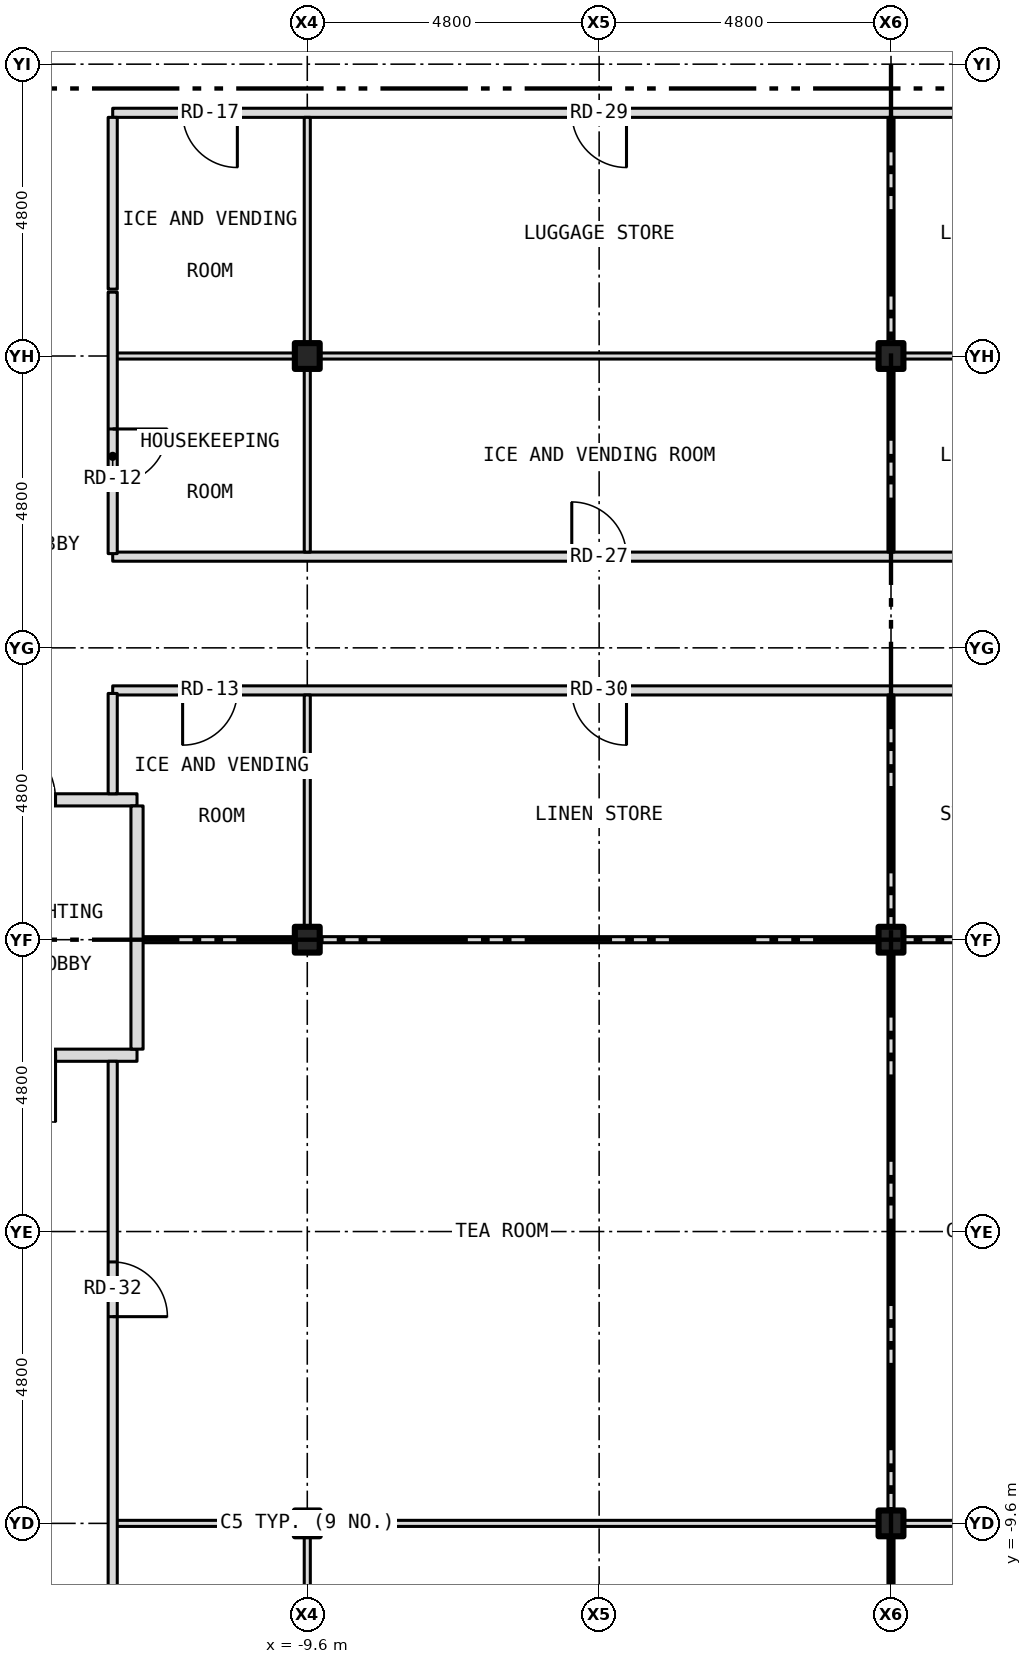
"""IFC4 building model, lengths in metres.
Left out: names, types, materials, properties, quantities, classifications, styles, units other than length and angle.
Written with IfcOpenShell. Run it as: python <this file> out.ifc"""

import sys

from ifc_helpers import new_model, si_unit, direction, frame, frame_2d, origin, origin_2d, place, context, subcontext, project, spatial, rectangle, i_section, extrude, element, fill, save


model = new_model("IFC4")
c1 = context("Model", 3, precision=1e-05, world=origin(), true_north=direction((0.0, 1.0)))
c2 = subcontext(c1, "Body", "Model", "MODEL_VIEW")
j1 = project(units=[si_unit("LENGTHUNIT", "METRE"), si_unit("PLANEANGLEUNIT", "RADIAN")], contexts=[c1])
p1 = place(None, origin())
s1 = spatial("IfcSite", under=j1, at=p1, CompositionType="ELEMENT")
p2 = place(p1, origin())
s2 = spatial("IfcBuilding", under=s1, at=p2, CompositionType="ELEMENT")
p3 = place(p2, frame((0.0, 0.0, 49.5)))
s3 = spatial("IfcBuildingStorey", under=s2, at=p3, CompositionType="ELEMENT", Elevation=49.5)
for number, where, z_axis, x_axis in (
    (1, (-9.6, -9.6, -0.15), (0.0, 0.0, 1.0), (1.0, 0.0, 0.0)),
    (2, (-9.6, 0.0, -0.15), (0.0, 0.0, 1.0), (1.0, 0.0, 0.0)),
    (3, (-9.6, 9.6, -0.15), (0.0, 0.0, 1.0), (1.0, 0.0, 0.0)),
    (4, (0.0, -9.6, -0.15), (0.0, 0.0, 1.0), (1.0, 0.0, 0.0)),
    (5, (0.0, 0.0, -0.15), (0.0, 0.0, 1.0), (1.0, 0.0, 0.0)),
    (6, (0.0, 9.6, -0.15), (0.0, 0.0, 1.0), (1.0, 0.0, 0.0)),
):
    element("IfcColumn", number, at=place(p3, frame(where, z_axis=z_axis, x_axis=x_axis)), inside=s3, PredefinedType="COLUMN", context=c2, shape_type="SweptSolid", body=[
        extrude(i_section(OverallWidth=0.409, OverallDepth=0.424, WebThickness=0.033, FlangeThickness=0.052, at=origin_2d()), origin(), (0.0, 0.0, 1.0), 3.5),
    ])
p4 = place(p3, frame((-12.8, -9.6, 0.0), z_axis=(0.0, 0.0, 1.0), x_axis=(1.0, 0.0, 0.0)))
e7 = element("IfcWall", 7, at=p4, inside=s3, PredefinedType="PARTITIONING", context=c2, shape_type="SweptSolid", body=[
    extrude(rectangle(XDim=2.996, YDim=0.1, at=frame_2d((1.498, 0.0))), origin(), (0.0, 0.0, 1.0), 2.728),
])
p5 = place(p3, frame((-9.804, -9.6, 0.0), z_axis=(0.0, 0.0, 1.0), x_axis=(1.0, 0.0, 0.0)))
e8 = element("IfcWall", 8, at=p5, inside=s3, PredefinedType="PARTITIONING", context=c2, shape_type="SweptSolid", body=[
    extrude(rectangle(XDim=0.408, YDim=0.1, at=frame_2d((0.204, 0.0))), origin(), (0.0, 0.0, 1.0), 3.35),
])
p6 = place(p3, frame((-9.396, -9.6, 0.0), z_axis=(0.0, 0.0, 1.0), x_axis=(1.0, 0.0, 0.0)))
e9 = element("IfcWall", 9, at=p6, inside=s3, PredefinedType="PARTITIONING", context=c2, shape_type="SweptSolid", body=[
    extrude(rectangle(XDim=9.192, YDim=0.1, at=frame_2d((4.596, 0.0))), origin(), (0.0, 0.0, 1.0), 2.728),
])
p7 = place(p3, frame((-0.204, -9.6, 0.0), z_axis=(0.0, 0.0, 1.0), x_axis=(1.0, 0.0, 0.0)))
e10 = element("IfcWall", 10, at=p7, inside=s3, PredefinedType="PARTITIONING", context=c2, shape_type="SweptSolid", body=[
    extrude(rectangle(XDim=0.408, YDim=0.1, at=frame_2d((0.204, 0.0))), origin(), (0.0, 0.0, 1.0), 3.35),
])
p8 = place(p3, frame((0.204, -9.6, 0.0), z_axis=(0.0, 0.0, 1.0), x_axis=(1.0, 0.0, 0.0)))
e11 = element("IfcWall", 11, at=p8, inside=s3, PredefinedType="PARTITIONING", context=c2, shape_type="SweptSolid", body=[
    extrude(rectangle(XDim=3.896, YDim=0.1, at=frame_2d((1.948, 0.0))), origin(), (0.0, 0.0, 1.0), 2.728),
])
p9 = place(p3, frame((-15.68, -1.9, 0.0), z_axis=(0.0, 0.0, 1.0), x_axis=(1.0, 0.0, 0.0)))
e12 = element("IfcWall", 12, at=p9, inside=s3, PredefinedType="PARTITIONING", context=c2, shape_type="SweptSolid", body=[
    extrude(rectangle(XDim=3.28, YDim=0.2, at=frame_2d((1.64, 0.0))), origin(), (0.0, 0.0, 1.0), 3.35),
])
p10 = place(p9, frame((0.84, 0.0, 0.0)))
e13 = element("IfcOpeningElement", 13, at=p10, cuts=e12, PredefinedType="OPENING", context=c2, shape_type="SweptSolid", body=[
    extrude(rectangle(XDim=1.1, YDim=2.1, at=frame_2d((0.55, 1.05))), frame((0.0, 0.112, 0.0), z_axis=(0.0, -1.0, 0.0), x_axis=(1.0, 0.0, 0.0)), (0.0, 0.0, 1.0), 0.224),
])
p11 = place(p3, frame((-12.4, 0.0, 0.0), z_axis=(0.0, 0.0, 1.0), x_axis=(1.0, 0.0, 0.0)))
e14 = element("IfcWall", 14, at=p11, inside=s3, PredefinedType="PARTITIONING", context=c2, shape_type="SweptSolid", body=[
    extrude(rectangle(XDim=2.596, YDim=0.1, at=frame_2d((1.298, 0.0))), origin(), (0.0, 0.0, 1.0), 2.728),
])
p12 = place(p3, frame((-9.804, 0.0, 0.0), z_axis=(0.0, 0.0, 1.0), x_axis=(1.0, 0.0, 0.0)))
e15 = element("IfcWall", 15, at=p12, inside=s3, PredefinedType="PARTITIONING", context=c2, shape_type="SweptSolid", body=[
    extrude(rectangle(XDim=0.408, YDim=0.1, at=frame_2d((0.204, 0.0))), origin(), (0.0, 0.0, 1.0), 3.35),
])
p13 = place(p3, frame((-9.396, 0.0, 0.0), z_axis=(0.0, 0.0, 1.0), x_axis=(1.0, 0.0, 0.0)))
e16 = element("IfcWall", 16, at=p13, inside=s3, PredefinedType="PARTITIONING", context=c2, shape_type="SweptSolid", body=[
    extrude(rectangle(XDim=9.192, YDim=0.1, at=frame_2d((4.596, 0.0))), origin(), (0.0, 0.0, 1.0), 2.728),
])
p14 = place(p3, frame((-0.204, 0.0, 0.0), z_axis=(0.0, 0.0, 1.0), x_axis=(1.0, 0.0, 0.0)))
e17 = element("IfcWall", 17, at=p14, inside=s3, PredefinedType="PARTITIONING", context=c2, shape_type="SweptSolid", body=[
    extrude(rectangle(XDim=0.408, YDim=0.1, at=frame_2d((0.204, 0.0))), origin(), (0.0, 0.0, 1.0), 3.35),
])
p15 = place(p3, frame((0.204, 0.0, 0.0), z_axis=(0.0, 0.0, 1.0), x_axis=(1.0, 0.0, 0.0)))
e18 = element("IfcWall", 18, at=p15, inside=s3, PredefinedType="PARTITIONING", context=c2, shape_type="SweptSolid", body=[
    extrude(rectangle(XDim=3.896, YDim=0.1, at=frame_2d((1.948, 0.0))), origin(), (0.0, 0.0, 1.0), 2.728),
])
p16 = place(p3, frame((-15.68, 2.3, 0.0), z_axis=(0.0, 0.0, 1.0), x_axis=(1.0, 0.0, 0.0)))
e19 = element("IfcWall", 19, at=p16, inside=s3, PredefinedType="PARTITIONING", context=c2, shape_type="SweptSolid", body=[
    extrude(rectangle(XDim=3.28, YDim=0.2, at=frame_2d((1.64, 0.0))), origin(), (0.0, 0.0, 1.0), 3.35),
])
p17 = place(p16, frame((0.84, 0.0, 0.0)))
e20 = element("IfcOpeningElement", 20, at=p17, cuts=e19, PredefinedType="OPENING", context=c2, shape_type="SweptSolid", body=[
    extrude(rectangle(XDim=1.1, YDim=2.1, at=frame_2d((0.55, 1.05))), frame((0.0, 0.112, 0.0), z_axis=(0.0, -1.0, 0.0), x_axis=(1.0, 0.0, 0.0)), (0.0, 0.0, 1.0), 0.224),
])
p18 = place(p3, frame((-12.8, 4.1, 0.0), z_axis=(0.0, 0.0, 1.0), x_axis=(1.0, 0.0, 0.0)))
e21 = element("IfcWall", 21, at=p18, inside=s3, PredefinedType="PARTITIONING", context=c2, shape_type="SweptSolid", body=[
    extrude(rectangle(XDim=16.9, YDim=0.15, at=frame_2d((8.45, 0.0))), origin(), (0.0, 0.0, 1.0), 3.35),
])
p19 = place(p18, frame((1.15, 0.0, 0.0)))
e22 = element("IfcOpeningElement", 22, at=p19, cuts=e21, PredefinedType="OPENING", context=c2, shape_type="SweptSolid", body=[
    extrude(rectangle(XDim=0.9, YDim=2.1, at=frame_2d((0.45, 1.05))), frame((0.0, 0.087, 0.0), z_axis=(0.0, -1.0, 0.0), x_axis=(1.0, 0.0, 0.0)), (0.0, 0.0, 1.0), 0.174),
])
p20 = place(p18, frame((14.4, 0.0, 0.0)))
e23 = element("IfcOpeningElement", 23, at=p20, cuts=e21, PredefinedType="OPENING", context=c2, shape_type="SweptSolid", body=[
    extrude(rectangle(XDim=0.9, YDim=2.1, at=frame_2d((0.45, 1.05))), frame((0.0, 0.087, 0.0), z_axis=(0.0, -1.0, 0.0), x_axis=(1.0, 0.0, 0.0)), (0.0, 0.0, 1.0), 0.174),
])
p21 = place(p18, frame((7.55, 0.0, 0.0)))
e24 = element("IfcOpeningElement", 24, at=p21, cuts=e21, PredefinedType="OPENING", context=c2, shape_type="SweptSolid", body=[
    extrude(rectangle(XDim=0.9, YDim=2.1, at=frame_2d((0.45, 1.05))), frame((0.0, 0.087, 0.0), z_axis=(0.0, -1.0, 0.0), x_axis=(1.0, 0.0, 0.0)), (0.0, 0.0, 1.0), 0.174),
])
p22 = place(p3, frame((-12.8, 6.3, 0.0), z_axis=(0.0, 0.0, 1.0), x_axis=(1.0, 0.0, 0.0)))
e25 = element("IfcWall", 25, at=p22, inside=s3, PredefinedType="PARTITIONING", context=c2, shape_type="SweptSolid", body=[
    extrude(rectangle(XDim=16.9, YDim=0.15, at=frame_2d((8.45, 0.0))), origin(), (0.0, 0.0, 1.0), 3.35),
])
p23 = place(p22, frame((14.4, 0.0, 0.0)))
e26 = element("IfcOpeningElement", 26, at=p23, cuts=e25, PredefinedType="OPENING", context=c2, shape_type="SweptSolid", body=[
    extrude(rectangle(XDim=0.9, YDim=2.1, at=frame_2d((0.45, 1.05))), frame((0.0, 0.087, 0.0), z_axis=(0.0, -1.0, 0.0), x_axis=(1.0, 0.0, 0.0)), (0.0, 0.0, 1.0), 0.174),
])
p24 = place(p22, frame((7.55, 0.0, 0.0)))
e27 = element("IfcOpeningElement", 27, at=p24, cuts=e25, PredefinedType="OPENING", context=c2, shape_type="SweptSolid", body=[
    extrude(rectangle(XDim=0.9, YDim=2.1, at=frame_2d((0.45, 1.05))), frame((0.0, 0.087, 0.0), z_axis=(0.0, -1.0, 0.0), x_axis=(1.0, 0.0, 0.0)), (0.0, 0.0, 1.0), 0.174),
])
p25 = place(p3, frame((-12.8, 9.6, 0.0), z_axis=(0.0, 0.0, 1.0), x_axis=(1.0, 0.0, 0.0)))
e28 = element("IfcWall", 28, at=p25, inside=s3, PredefinedType="PARTITIONING", context=c2, shape_type="SweptSolid", body=[
    extrude(rectangle(XDim=2.996, YDim=0.1, at=frame_2d((1.498, 0.0))), origin(), (0.0, 0.0, 1.0), 2.728),
])
p26 = place(p3, frame((-9.804, 9.6, 0.0), z_axis=(0.0, 0.0, 1.0), x_axis=(1.0, 0.0, 0.0)))
e29 = element("IfcWall", 29, at=p26, inside=s3, PredefinedType="PARTITIONING", context=c2, shape_type="SweptSolid", body=[
    extrude(rectangle(XDim=0.408, YDim=0.1, at=frame_2d((0.204, 0.0))), origin(), (0.0, 0.0, 1.0), 3.35),
])
p27 = place(p3, frame((-9.396, 9.6, 0.0), z_axis=(0.0, 0.0, 1.0), x_axis=(1.0, 0.0, 0.0)))
e30 = element("IfcWall", 30, at=p27, inside=s3, PredefinedType="PARTITIONING", context=c2, shape_type="SweptSolid", body=[
    extrude(rectangle(XDim=9.192, YDim=0.1, at=frame_2d((4.596, 0.0))), origin(), (0.0, 0.0, 1.0), 2.728),
])
p28 = place(p3, frame((-0.204, 9.6, 0.0), z_axis=(0.0, 0.0, 1.0), x_axis=(1.0, 0.0, 0.0)))
e31 = element("IfcWall", 31, at=p28, inside=s3, PredefinedType="PARTITIONING", context=c2, shape_type="SweptSolid", body=[
    extrude(rectangle(XDim=0.408, YDim=0.1, at=frame_2d((0.204, 0.0))), origin(), (0.0, 0.0, 1.0), 3.35),
])
p29 = place(p3, frame((0.204, 9.6, 0.0), z_axis=(0.0, 0.0, 1.0), x_axis=(1.0, 0.0, 0.0)))
e32 = element("IfcWall", 32, at=p29, inside=s3, PredefinedType="PARTITIONING", context=c2, shape_type="SweptSolid", body=[
    extrude(rectangle(XDim=3.896, YDim=0.1, at=frame_2d((1.948, 0.0))), origin(), (0.0, 0.0, 1.0), 2.728),
])
p30 = place(p3, frame((-12.8, 13.6, 0.0), z_axis=(0.0, 0.0, 1.0), x_axis=(1.0, 0.0, 0.0)))
e33 = element("IfcWall", 33, at=p30, inside=s3, PredefinedType="PARTITIONING", context=c2, shape_type="SweptSolid", body=[
    extrude(rectangle(XDim=16.9, YDim=0.15, at=frame_2d((8.45, 0.0))), origin(), (0.0, 0.0, 1.0), 3.35),
])
p31 = place(p30, frame((1.15, 0.0, 0.0)))
e34 = element("IfcOpeningElement", 34, at=p31, cuts=e33, PredefinedType="OPENING", context=c2, shape_type="SweptSolid", body=[
    extrude(rectangle(XDim=0.9, YDim=2.1, at=frame_2d((0.45, 1.05))), frame((0.0, 0.087, 0.0), z_axis=(0.0, -1.0, 0.0), x_axis=(1.0, 0.0, 0.0)), (0.0, 0.0, 1.0), 0.174),
])
p32 = place(p30, frame((14.4, 0.0, 0.0)))
e35 = element("IfcOpeningElement", 35, at=p32, cuts=e33, PredefinedType="OPENING", context=c2, shape_type="SweptSolid", body=[
    extrude(rectangle(XDim=0.9, YDim=2.1, at=frame_2d((0.45, 1.05))), frame((0.0, 0.087, 0.0), z_axis=(0.0, -1.0, 0.0), x_axis=(1.0, 0.0, 0.0)), (0.0, 0.0, 1.0), 0.174),
])
p33 = place(p30, frame((7.55, 0.0, 0.0)))
e36 = element("IfcOpeningElement", 36, at=p33, cuts=e33, PredefinedType="OPENING", context=c2, shape_type="SweptSolid", body=[
    extrude(rectangle(XDim=0.9, YDim=2.1, at=frame_2d((0.45, 1.05))), frame((0.0, 0.087, 0.0), z_axis=(0.0, -1.0, 0.0), x_axis=(1.0, 0.0, 0.0)), (0.0, 0.0, 1.0), 0.174),
])
p34 = place(p3, frame((-12.8, -13.525, 0.0), z_axis=(0.0, 0.0, 1.0), x_axis=(0.0, 1.0, 0.0)))
e37 = element("IfcWall", 37, at=p34, inside=s3, PredefinedType="PARTITIONING", context=c2, shape_type="SweptSolid", body=[
    extrude(rectangle(XDim=11.525, YDim=0.15, at=frame_2d((5.762, 0.0))), origin(), (0.0, 0.0, 1.0), 3.35),
])
p35 = place(p34, frame((7.325, 0.0, 0.0)))
e38 = element("IfcOpeningElement", 38, at=p35, cuts=e37, PredefinedType="OPENING", context=c2, shape_type="SweptSolid", body=[
    extrude(rectangle(XDim=0.9, YDim=2.1, at=frame_2d((0.45, 1.05))), frame((0.0, 0.087, 0.0), z_axis=(0.0, -1.0, 0.0), x_axis=(1.0, 0.0, 0.0)), (0.0, 0.0, 1.0), 0.174),
])
p36 = place(p3, frame((-12.8, 2.4, 0.0), z_axis=(0.0, 0.0, 1.0), x_axis=(0.0, 1.0, 0.0)))
e39 = element("IfcWall", 39, at=p36, inside=s3, PredefinedType="PARTITIONING", context=c2, shape_type="SweptSolid", body=[
    extrude(rectangle(XDim=1.65, YDim=0.15, at=frame_2d((0.825, 0.0))), origin(), (0.0, 0.0, 1.0), 3.35),
])
p37 = place(p3, frame((-12.8, 6.35, 0.0), z_axis=(0.0, 0.0, 1.0), x_axis=(0.0, 1.0, 0.0)))
e40 = element("IfcWall", 40, at=p37, inside=s3, PredefinedType="PARTITIONING", context=c2, shape_type="SweptSolid", body=[
    extrude(rectangle(XDim=4.3, YDim=0.15, at=frame_2d((2.15, 0.0))), origin(), (0.0, 0.0, 1.0), 3.35),
])
p38 = place(p37, frame((1.15, 0.0, 0.0)))
e41 = element("IfcOpeningElement", 41, at=p38, cuts=e40, PredefinedType="OPENING", context=c2, shape_type="SweptSolid", body=[
    extrude(rectangle(XDim=0.9, YDim=2.1, at=frame_2d((0.45, 1.05))), frame((0.0, 0.087, 0.0), z_axis=(0.0, -1.0, 0.0), x_axis=(1.0, 0.0, 0.0)), (0.0, 0.0, 1.0), 0.174),
])
p39 = place(p3, frame((-12.8, 10.7, 0.0), z_axis=(0.0, 0.0, 1.0), x_axis=(0.0, 1.0, 0.0)))
e42 = element("IfcWall", 42, at=p39, inside=s3, PredefinedType="PARTITIONING", context=c2, shape_type="SweptSolid", body=[
    extrude(rectangle(XDim=2.825, YDim=0.15, at=frame_2d((1.413, 0.0))), origin(), (0.0, 0.0, 1.0), 3.35),
])
p40 = place(p3, frame((-12.4, -1.8, 0.0), z_axis=(0.0, 0.0, 1.0), x_axis=(0.0, 1.0, 0.0)))
e43 = element("IfcWall", 43, at=p40, inside=s3, PredefinedType="PARTITIONING", context=c2, shape_type="SweptSolid", body=[
    extrude(rectangle(XDim=4.0, YDim=0.2, at=frame_2d((2.0, 0.0))), origin(), (0.0, 0.0, 1.0), 3.35),
])
p41 = place(p3, frame((-9.6, -13.525, 0.0), z_axis=(0.0, 0.0, 1.0), x_axis=(0.0, 1.0, 0.0)))
e44 = element("IfcWall", 44, at=p41, inside=s3, PredefinedType="PARTITIONING", context=c2, shape_type="SweptSolid", body=[
    extrude(rectangle(XDim=3.875, YDim=0.1, at=frame_2d((1.938, 0.0))), origin(), (0.0, 0.0, 1.0), 2.728),
])
p42 = place(p3, frame((-9.6, 0.05, 0.0), z_axis=(0.0, 0.0, 1.0), x_axis=(0.0, 1.0, 0.0)))
e45 = element("IfcWall", 45, at=p42, inside=s3, PredefinedType="PARTITIONING", context=c2, shape_type="SweptSolid", body=[
    extrude(rectangle(XDim=3.975, YDim=0.1, at=frame_2d((1.987, 0.0))), origin(), (0.0, 0.0, 1.0), 2.728),
])
p43 = place(p3, frame((-9.6, 6.375, 0.0), z_axis=(0.0, 0.0, 1.0), x_axis=(0.0, 1.0, 0.0)))
e46 = element("IfcWall", 46, at=p43, inside=s3, PredefinedType="PARTITIONING", context=c2, shape_type="SweptSolid", body=[
    extrude(rectangle(XDim=3.175, YDim=0.1, at=frame_2d((1.587, 0.0))), origin(), (0.0, 0.0, 1.0), 2.728),
])
for number, where, z_axis, x_axis in (
    (47, (-9.6, 9.65, 0.0), (0.0, 0.0, 1.0), (0.0, 1.0, 0.0)),
    (48, (0.0, -13.525, 0.0), (0.0, 0.0, 1.0), (0.0, 1.0, 0.0)),
):
    element("IfcWall", number, at=place(p3, frame(where, z_axis=z_axis, x_axis=x_axis)), inside=s3, PredefinedType="PARTITIONING", context=c2, shape_type="SweptSolid", body=[
        extrude(rectangle(XDim=3.875, YDim=0.1, at=frame_2d((1.938, 0.0))), origin(), (0.0, 0.0, 1.0), 2.728),
    ])
p44 = place(p3, frame((0.0, -9.55, 0.0), z_axis=(0.0, 0.0, 1.0), x_axis=(0.0, 1.0, 0.0)))
e49 = element("IfcWall", 49, at=p44, inside=s3, PredefinedType="PARTITIONING", context=c2, shape_type="SweptSolid", body=[
    extrude(rectangle(XDim=9.5, YDim=0.1, at=frame_2d((4.75, 0.0))), origin(), (0.0, 0.0, 1.0), 2.728),
])
p45 = place(p3, frame((0.0, 0.05, 0.0), z_axis=(0.0, 0.0, 1.0), x_axis=(0.0, 1.0, 0.0)))
e50 = element("IfcWall", 50, at=p45, inside=s3, PredefinedType="PARTITIONING", context=c2, shape_type="SweptSolid", body=[
    extrude(rectangle(XDim=3.975, YDim=0.1, at=frame_2d((1.987, 0.0))), origin(), (0.0, 0.0, 1.0), 2.728),
])
p46 = place(p3, frame((0.0, 6.375, 0.0), z_axis=(0.0, 0.0, 1.0), x_axis=(0.0, 1.0, 0.0)))
e51 = element("IfcWall", 51, at=p46, inside=s3, PredefinedType="PARTITIONING", context=c2, shape_type="SweptSolid", body=[
    extrude(rectangle(XDim=3.175, YDim=0.1, at=frame_2d((1.587, 0.0))), origin(), (0.0, 0.0, 1.0), 2.728),
])
p47 = place(p3, frame((0.0, 9.65, 0.0), z_axis=(0.0, 0.0, 1.0), x_axis=(0.0, 1.0, 0.0)))
e52 = element("IfcWall", 52, at=p47, inside=s3, PredefinedType="PARTITIONING", context=c2, shape_type="SweptSolid", body=[
    extrude(rectangle(XDim=3.875, YDim=0.1, at=frame_2d((1.938, 0.0))), origin(), (0.0, 0.0, 1.0), 2.728),
])
p48 = place(p17, origin())
e53 = element("IfcDoor", 53, at=p48, inside=s3, OperationType="SINGLE_SWING_LEFT", PredefinedType="DOOR", context=c2, shape_type="SweptSolid", body=[
    extrude(rectangle(XDim=1.1, YDim=2.1, at=frame_2d((0.55, 1.05))), frame((0.0, 0.025, 0.0), z_axis=(0.0, -1.0, 0.0), x_axis=(1.0, 0.0, 0.0)), (0.0, 0.0, 1.0), 0.05),
])
fill(e20, e53)
p49 = place(p10, origin())
e54 = element("IfcDoor", 54, at=p49, inside=s3, OperationType="SINGLE_SWING_RIGHT", PredefinedType="DOOR", context=c2, shape_type="SweptSolid", body=[
    extrude(rectangle(XDim=1.1, YDim=2.1, at=frame_2d((0.55, 1.05))), frame((0.0, 0.025, 0.0), z_axis=(0.0, -1.0, 0.0), x_axis=(1.0, 0.0, 0.0)), (0.0, 0.0, 1.0), 0.05),
])
fill(e13, e54)
p50 = place(p38, origin())
e55 = element("IfcDoor", 55, at=p50, inside=s3, OperationType="SINGLE_SWING_RIGHT", PredefinedType="DOOR", context=c2, shape_type="SweptSolid", body=[
    extrude(rectangle(XDim=0.9, YDim=2.1, at=frame_2d((0.45, 1.05))), frame((0.0, 0.025, 0.0), z_axis=(0.0, -1.0, 0.0), x_axis=(1.0, 0.0, 0.0)), (0.0, 0.0, 1.0), 0.05),
])
fill(e41, e55)
p51 = place(p19, origin())
e56 = element("IfcDoor", 56, at=p51, inside=s3, OperationType="SINGLE_SWING_LEFT", PredefinedType="DOOR", context=c2, shape_type="SweptSolid", body=[
    extrude(rectangle(XDim=0.9, YDim=2.1, at=frame_2d((0.45, 1.05))), frame((0.0, 0.025, 0.0), z_axis=(0.0, -1.0, 0.0), x_axis=(1.0, 0.0, 0.0)), (0.0, 0.0, 1.0), 0.05),
])
fill(e22, e56)
p52 = place(p31, origin())
e57 = element("IfcDoor", 57, at=p52, inside=s3, OperationType="SINGLE_SWING_RIGHT", PredefinedType="DOOR", context=c2, shape_type="SweptSolid", body=[
    extrude(rectangle(XDim=0.9, YDim=2.1, at=frame_2d((0.45, 1.05))), frame((0.0, 0.025, 0.0), z_axis=(0.0, -1.0, 0.0), x_axis=(1.0, 0.0, 0.0)), (0.0, 0.0, 1.0), 0.05),
])
fill(e34, e57)
p53 = place(p24, origin())
e58 = element("IfcDoor", 58, at=p53, inside=s3, OperationType="SINGLE_SWING_LEFT", PredefinedType="DOOR", context=c2, shape_type="SweptSolid", body=[
    extrude(rectangle(XDim=0.9, YDim=2.1, at=frame_2d((0.45, 1.05))), frame((0.0, 0.025, 0.0), z_axis=(0.0, -1.0, 0.0), x_axis=(1.0, 0.0, 0.0)), (0.0, 0.0, 1.0), 0.05),
])
fill(e27, e58)
p54 = place(p33, origin())
e59 = element("IfcDoor", 59, at=p54, inside=s3, OperationType="SINGLE_SWING_RIGHT", PredefinedType="DOOR", context=c2, shape_type="SweptSolid", body=[
    extrude(rectangle(XDim=0.9, YDim=2.1, at=frame_2d((0.45, 1.05))), frame((0.0, 0.025, 0.0), z_axis=(0.0, -1.0, 0.0), x_axis=(1.0, 0.0, 0.0)), (0.0, 0.0, 1.0), 0.05),
])
fill(e36, e59)
p55 = place(p21, origin())
e60 = element("IfcDoor", 60, at=p55, inside=s3, OperationType="SINGLE_SWING_RIGHT", PredefinedType="DOOR", context=c2, shape_type="SweptSolid", body=[
    extrude(rectangle(XDim=0.9, YDim=2.1, at=frame_2d((0.45, 1.05))), frame((0.0, 0.025, 0.0), z_axis=(0.0, -1.0, 0.0), x_axis=(1.0, 0.0, 0.0)), (0.0, 0.0, 1.0), 0.05),
])
fill(e24, e60)
p56 = place(p35, origin())
e61 = element("IfcDoor", 61, at=p56, inside=s3, OperationType="SINGLE_SWING_LEFT", PredefinedType="DOOR", context=c2, shape_type="SweptSolid", body=[
    extrude(rectangle(XDim=0.9, YDim=2.1, at=frame_2d((0.45, 1.05))), frame((0.0, 0.025, 0.0), z_axis=(0.0, -1.0, 0.0), x_axis=(1.0, 0.0, 0.0)), (0.0, 0.0, 1.0), 0.05),
])
fill(e38, e61)
save(model, sys.argv[1])
